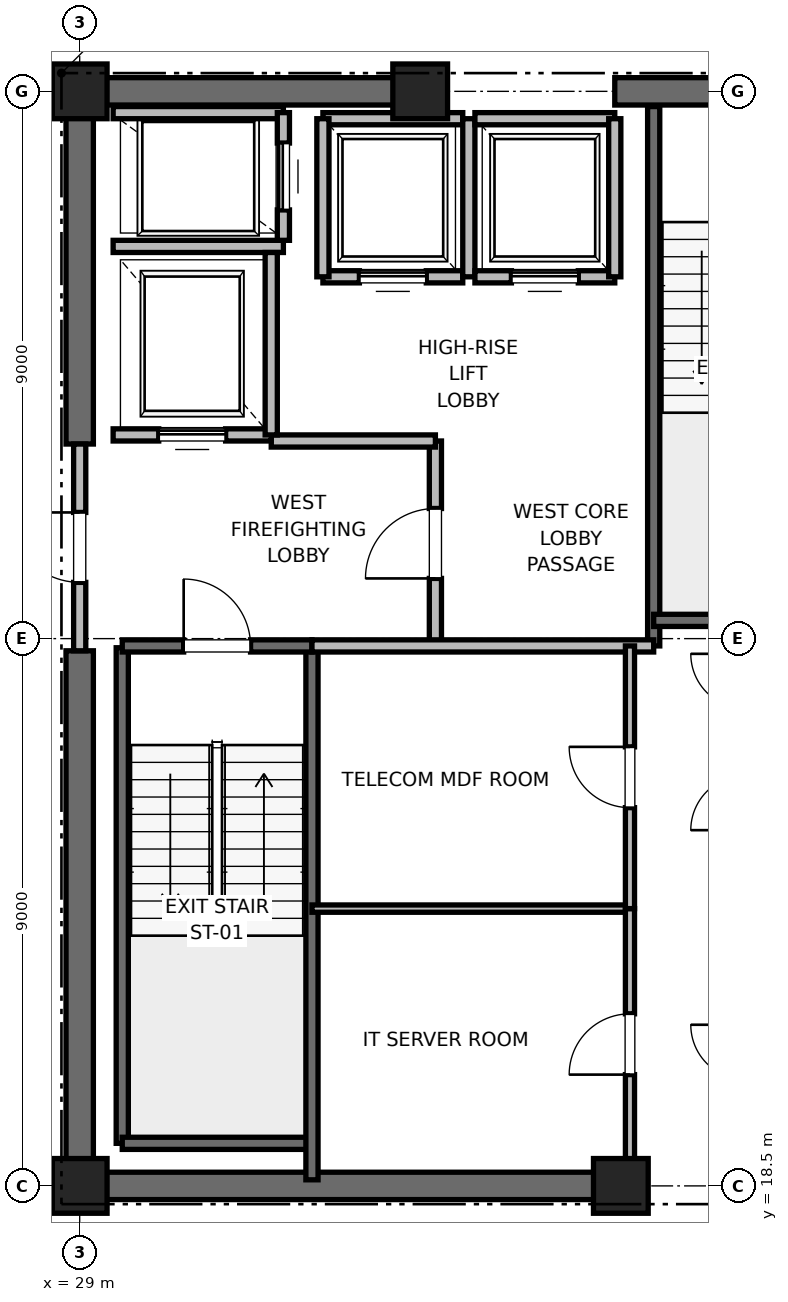
"""IFC4 building model, lengths in metres.
Left out: names, types, materials, properties, quantities, classifications, styles, units other than length and angle.
Written with IfcOpenShell. Run it as: python <this file> out.ifc"""

import sys

from ifc_helpers import new_model, si_unit, direction, frame, frame_2d, origin, origin_2d, place, context, subcontext, project, spatial, rectangle, extrude, element, fill, save


model = new_model("IFC4")
c1 = context("Model", 3, precision=1e-05, world=origin(), true_north=direction((0.0, 1.0)))
c2 = subcontext(c1, "Body", "Model", "MODEL_VIEW")
j1 = project(units=[si_unit("LENGTHUNIT", "METRE"), si_unit("PLANEANGLEUNIT", "RADIAN")], contexts=[c1])
p1 = place(None, origin())
s1 = spatial("IfcSite", under=j1, at=p1, CompositionType="ELEMENT")
p2 = place(p1, origin())
s2 = spatial("IfcBuilding", under=s1, at=p2, CompositionType="ELEMENT")
p3 = place(p2, frame((0.0, 0.0, 291.2)))
s3 = spatial("IfcBuildingStorey", under=s2, at=p3, CompositionType="ELEMENT", Elevation=291.2)
for number, where, z_axis, x_axis in (
    (1, (29.0, 18.5, 0.0), (0.0, 0.0, 1.0), (1.0, 0.0, 0.0)),
    (2, (29.0, 36.5, 0.0), (0.0, 0.0, 1.0), (1.0, 0.0, 0.0)),
    (3, (37.9, 18.5, 0.0), (0.0, 0.0, 1.0), (1.0, 0.0, 0.0)),
    (4, (34.6, 36.5, 0.0), (0.0, 0.0, 1.0), (1.0, 0.0, 0.0)),
):
    element("IfcColumn", number, at=place(p3, frame(where, z_axis=z_axis, x_axis=x_axis)), inside=s3, PredefinedType="PILASTER", context=c2, shape_type="SweptSolid", body=[
        extrude(rectangle(XDim=0.9, YDim=0.9, at=origin_2d()), origin(), (0.0, 0.0, 1.0), 4.0),
    ])
p4 = place(p3, frame((29.0, 18.5, 0.0), z_axis=(0.0, 0.0, 1.0), x_axis=(1.0, 0.0, 0.0)))
e5 = element("IfcWall", 5, at=p4, inside=s3, PredefinedType="SHEAR", context=c2, shape_type="SweptSolid", body=[
    extrude(rectangle(XDim=9.2, YDim=0.45, at=frame_2d((4.6, 0.0))), origin(), (0.0, 0.0, 1.0), 3.7),
])
p5 = place(p3, frame((29.0, 36.5, 0.0), z_axis=(0.0, 0.0, 1.0), x_axis=(1.0, 0.0, 0.0)))
e6 = element("IfcWall", 6, at=p5, inside=s3, PredefinedType="SHEAR", context=c2, shape_type="SweptSolid", body=[
    extrude(rectangle(XDim=5.8, YDim=0.45, at=frame_2d((2.9, 0.0))), origin(), (0.0, 0.0, 1.0), 3.7),
])
p6 = place(p3, frame((37.8, 36.5, 0.0), z_axis=(0.0, 0.0, 1.0), x_axis=(1.0, 0.0, 0.0)))
e7 = element("IfcWall", 7, at=p6, inside=s3, PredefinedType="SHEAR", context=c2, shape_type="SweptSolid", body=[
    extrude(rectangle(XDim=4.4, YDim=0.45, at=frame_2d((2.2, 0.0))), origin(), (0.0, 0.0, 1.0), 3.7),
])
p7 = place(p6, frame((1.65, 0.0, 0.0)))
e8 = element("IfcOpeningElement", 8, at=p7, cuts=e7, PredefinedType="OPENING", context=c2, shape_type="SweptSolid", body=[
    extrude(rectangle(XDim=1.1, YDim=2.15, at=frame_2d((0.55, 1.075))), frame((0.0, 0.225, 0.0), z_axis=(0.0, -1.0, 0.0), x_axis=(1.0, 0.0, 0.0)), (0.0, 0.0, 1.0), 0.45),
])
p8 = place(p3, frame((29.0, 18.5, 0.0), z_axis=(0.0, 0.0, 1.0), x_axis=(0.0, 1.0, 0.0)))
e9 = element("IfcWall", 9, at=p8, inside=s3, PredefinedType="SHEAR", context=c2, shape_type="SweptSolid", body=[
    extrude(rectangle(XDim=8.8, YDim=0.45, at=frame_2d((4.4, 0.0))), origin(), (0.0, 0.0, 1.0), 3.7),
])
p9 = place(p3, frame((29.0, 30.7, 0.0), z_axis=(0.0, 0.0, 1.0), x_axis=(0.0, 1.0, 0.0)))
e10 = element("IfcWall", 10, at=p9, inside=s3, PredefinedType="SHEAR", context=c2, shape_type="SweptSolid", body=[
    extrude(rectangle(XDim=5.8, YDim=0.45, at=frame_2d((2.9, 0.0))), origin(), (0.0, 0.0, 1.0), 3.7),
])
p10 = place(p3, frame((29.7, 19.2, 0.0), z_axis=(0.0, 0.0, 1.0), x_axis=(0.0, 1.0, 0.0)))
e11 = element("IfcWall", 11, at=p10, inside=s3, PredefinedType="SOLIDWALL", context=c2, shape_type="SweptSolid", body=[
    extrude(rectangle(XDim=8.15, YDim=0.2, at=frame_2d((4.075, 0.0))), origin(), (0.0, 0.0, 1.0), 3.7),
])
p11 = place(p3, frame((29.7, 19.2, 0.0), z_axis=(0.0, 0.0, 1.0), x_axis=(1.0, 0.0, 0.0)))
e12 = element("IfcWall", 12, at=p11, inside=s3, PredefinedType="SOLIDWALL", context=c2, shape_type="SweptSolid", body=[
    extrude(rectangle(XDim=3.12, YDim=0.2, at=frame_2d((1.56, 0.0))), origin(), (0.0, 0.0, 1.0), 3.7),
])
p12 = place(p3, frame((32.82, 18.6, 0.0), z_axis=(0.0, 0.0, 1.0), x_axis=(0.0, 1.0, 0.0)))
e13 = element("IfcWall", 13, at=p12, inside=s3, PredefinedType="SOLIDWALL", context=c2, shape_type="SweptSolid", body=[
    extrude(rectangle(XDim=8.78, YDim=0.2, at=frame_2d((4.39, 0.0))), origin(), (0.0, 0.0, 1.0), 3.7),
])
p13 = place(p3, frame((29.7, 27.38, 0.0), z_axis=(0.0, 0.0, 1.0), x_axis=(1.0, 0.0, 0.0)))
e14 = element("IfcWall", 14, at=p13, inside=s3, PredefinedType="SOLIDWALL", context=c2, shape_type="SweptSolid", body=[
    extrude(rectangle(XDim=3.12, YDim=0.2, at=frame_2d((1.56, 0.0))), origin(), (0.0, 0.0, 1.0), 3.7),
])
p14 = place(p13, frame((1.01, 0.0, 0.0)))
e15 = element("IfcOpeningElement", 15, at=p14, cuts=e14, PredefinedType="OPENING", context=c2, shape_type="SweptSolid", body=[
    extrude(rectangle(XDim=1.1, YDim=2.15, at=frame_2d((0.55, 1.075))), frame((0.0, 0.1, 0.0), z_axis=(0.0, -1.0, 0.0), x_axis=(1.0, 0.0, 0.0)), (0.0, 0.0, 1.0), 0.2),
])
p15 = place(p3, frame((38.44, 27.38, 0.0), z_axis=(0.0, 0.0, 1.0), x_axis=(0.0, 1.0, 0.0)))
e16 = element("IfcWall", 16, at=p15, inside=s3, PredefinedType="SOLIDWALL", context=c2, shape_type="SweptSolid", body=[
    extrude(rectangle(XDim=8.87, YDim=0.2, at=frame_2d((4.435, 0.0))), origin(), (0.0, 0.0, 1.0), 3.7),
])
p16 = place(p3, frame((38.44, 27.8, 0.0), z_axis=(0.0, 0.0, 1.0), x_axis=(1.0, 0.0, 0.0)))
e17 = element("IfcWall", 17, at=p16, inside=s3, PredefinedType="SOLIDWALL", context=c2, shape_type="SweptSolid", body=[
    extrude(rectangle(XDim=3.32, YDim=0.2, at=frame_2d((1.66, 0.0))), origin(), (0.0, 0.0, 1.0), 3.7),
])
p17 = place(p3, frame((34.85, 27.38, 0.0), z_axis=(0.0, 0.0, 1.0), x_axis=(0.0, 1.0, 0.0)))
e18 = element("IfcWall", 18, at=p17, inside=s3, PredefinedType="PARTITIONING", context=c2, shape_type="SweptSolid", body=[
    extrude(rectangle(XDim=3.37, YDim=0.2, at=frame_2d((1.685, 0.0))), origin(), (0.0, 0.0, 1.0), 3.7),
])
p18 = place(p17, frame((1.11, 0.0, 0.0)))
e19 = element("IfcOpeningElement", 19, at=p18, cuts=e18, PredefinedType="OPENING", context=c2, shape_type="SweptSolid", body=[
    extrude(rectangle(XDim=1.15, YDim=2.2, at=frame_2d((0.575, 1.1))), frame((0.0, 0.1, 0.0), z_axis=(0.0, -1.0, 0.0), x_axis=(1.0, 0.0, 0.0)), (0.0, 0.0, 1.0), 0.2),
])
p19 = place(p3, frame((29.0, 27.3, 0.0), z_axis=(0.0, 0.0, 1.0), x_axis=(0.0, 1.0, 0.0)))
e20 = element("IfcWall", 20, at=p19, inside=s3, PredefinedType="PARTITIONING", context=c2, shape_type="SweptSolid", body=[
    extrude(rectangle(XDim=3.4, YDim=0.2, at=frame_2d((1.7, 0.0))), origin(), (0.0, 0.0, 1.0), 2.78),
])
p20 = place(p19, frame((1.125, 0.0, 0.0)))
e21 = element("IfcOpeningElement", 21, at=p20, cuts=e20, PredefinedType="OPENING", context=c2, shape_type="SweptSolid", body=[
    extrude(rectangle(XDim=1.15, YDim=2.2, at=frame_2d((0.575, 1.1))), frame((0.0, 0.1, 0.0), z_axis=(0.0, -1.0, 0.0), x_axis=(1.0, 0.0, 0.0)), (0.0, 0.0, 1.0), 0.2),
])
p21 = place(p3, frame((32.82, 27.38, 0.0), z_axis=(0.0, 0.0, 1.0), x_axis=(1.0, 0.0, 0.0)))
e22 = element("IfcWall", 22, at=p21, inside=s3, PredefinedType="PARTITIONING", context=c2, shape_type="SweptSolid", body=[
    extrude(rectangle(XDim=5.62, YDim=0.2, at=frame_2d((2.81, 0.0))), origin(), (0.0, 0.0, 1.0), 3.7),
])
p22 = place(p3, frame((32.15, 30.75, 0.0), z_axis=(0.0, 0.0, 1.0), x_axis=(1.0, 0.0, 0.0)))
e23 = element("IfcWall", 23, at=p22, inside=s3, PredefinedType="PARTITIONING", context=c2, shape_type="SweptSolid", body=[
    extrude(rectangle(XDim=2.7, YDim=0.2, at=frame_2d((1.35, 0.0))), origin(), (0.0, 0.0, 1.0), 3.7),
])
p23 = place(p3, frame((29.55, 30.85, 0.0), z_axis=(0.0, 0.0, 1.0), x_axis=(1.0, 0.0, 0.0)))
e24 = element("IfcWall", 24, at=p23, inside=s3, PredefinedType="SOLIDWALL", context=c2, shape_type="SweptSolid", body=[
    extrude(rectangle(XDim=2.6, YDim=0.2, at=frame_2d((1.3, 0.0))), origin(), (0.0, 0.0, 1.0), 2.78),
])
p24 = place(p23, frame((0.75, 0.0, 0.0)))
e25 = element("IfcOpeningElement", 25, at=p24, cuts=e24, PredefinedType="OPENING", context=c2, shape_type="SweptSolid", body=[
    extrude(rectangle(XDim=1.1, YDim=2.2, at=frame_2d((0.55, 1.1))), frame((0.0, 0.1, 0.0), z_axis=(0.0, -1.0, 0.0), x_axis=(1.0, 0.0, 0.0)), (0.0, 0.0, 1.0), 0.2),
])
p25 = place(p3, frame((29.55, 33.95, 0.0), z_axis=(0.0, 0.0, 1.0), x_axis=(1.0, 0.0, 0.0)))
e26 = element("IfcWall", 26, at=p25, inside=s3, PredefinedType="SOLIDWALL", context=c2, shape_type="SweptSolid", body=[
    extrude(rectangle(XDim=2.8, YDim=0.2, at=frame_2d((1.4, 0.0))), origin(), (0.0, 0.0, 1.0), 3.7),
])
p26 = place(p3, frame((32.15, 30.85, 0.0), z_axis=(0.0, 0.0, 1.0), x_axis=(0.0, 1.0, 0.0)))
e27 = element("IfcWall", 27, at=p26, inside=s3, PredefinedType="SOLIDWALL", context=c2, shape_type="SweptSolid", body=[
    extrude(rectangle(XDim=3.0, YDim=0.2, at=frame_2d((1.5, 0.0))), origin(), (0.0, 0.0, 1.0), 3.7),
])
p27 = place(p3, frame((32.35, 36.15, 0.0), z_axis=(0.0, 0.0, 1.0), x_axis=(-1.0, 0.0, 0.0)))
e28 = element("IfcWall", 28, at=p27, inside=s3, PredefinedType="SOLIDWALL", context=c2, shape_type="SweptSolid", body=[
    extrude(rectangle(XDim=2.8, YDim=0.2, at=frame_2d((1.4, 0.0))), origin(), (0.0, 0.0, 1.0), 2.753),
])
p28 = place(p3, frame((32.35, 34.05, 0.0), z_axis=(0.0, 0.0, 1.0), x_axis=(0.0, 1.0, 0.0)))
e29 = element("IfcWall", 29, at=p28, inside=s3, PredefinedType="SOLIDWALL", context=c2, shape_type="SweptSolid", body=[
    extrude(rectangle(XDim=2.1, YDim=0.2, at=frame_2d((1.05, 0.0))), origin(), (0.0, 0.0, 1.0), 3.7),
])
p29 = place(p28, frame((0.5, 0.0, 0.0)))
e30 = element("IfcOpeningElement", 30, at=p29, cuts=e29, PredefinedType="OPENING", context=c2, shape_type="SweptSolid", body=[
    extrude(rectangle(XDim=1.1, YDim=2.2, at=frame_2d((0.55, 1.1))), frame((0.0, 0.1, 0.0), z_axis=(0.0, -1.0, 0.0), x_axis=(1.0, 0.0, 0.0)), (0.0, 0.0, 1.0), 0.2),
])
p30 = place(p3, frame((33.0, 33.45, 0.0), z_axis=(0.0, 0.0, 1.0), x_axis=(1.0, 0.0, 0.0)))
e31 = element("IfcWall", 31, at=p30, inside=s3, PredefinedType="SOLIDWALL", context=c2, shape_type="SweptSolid", body=[
    extrude(rectangle(XDim=2.3, YDim=0.2, at=frame_2d((1.15, 0.0))), origin(), (0.0, 0.0, 1.0), 3.7),
])
p31 = place(p30, frame((0.6, 0.0, 0.0)))
e32 = element("IfcOpeningElement", 32, at=p31, cuts=e31, PredefinedType="OPENING", context=c2, shape_type="SweptSolid", body=[
    extrude(rectangle(XDim=1.1, YDim=2.2, at=frame_2d((0.55, 1.1))), frame((0.0, 0.1, 0.0), z_axis=(0.0, -1.0, 0.0), x_axis=(1.0, 0.0, 0.0)), (0.0, 0.0, 1.0), 0.2),
])
p32 = place(p3, frame((35.3, 36.05, 0.0), z_axis=(0.0, 0.0, 1.0), x_axis=(-1.0, 0.0, 0.0)))
e33 = element("IfcWall", 33, at=p32, inside=s3, PredefinedType="SOLIDWALL", context=c2, shape_type="SweptSolid", body=[
    extrude(rectangle(XDim=2.3, YDim=0.2, at=frame_2d((1.15, 0.0))), origin(), (0.0, 0.0, 1.0), 2.78),
])
p33 = place(p3, frame((33.0, 36.05, 0.0), z_axis=(0.0, 0.0, 1.0), x_axis=(0.0, -1.0, 0.0)))
e34 = element("IfcWall", 34, at=p33, inside=s3, PredefinedType="SOLIDWALL", context=c2, shape_type="SweptSolid", body=[
    extrude(rectangle(XDim=2.6, YDim=0.2, at=frame_2d((1.3, 0.0))), origin(), (0.0, 0.0, 1.0), 3.7),
])
p34 = place(p3, frame((35.4, 33.45, 0.0), z_axis=(0.0, 0.0, 1.0), x_axis=(0.0, 1.0, 0.0)))
e35 = element("IfcWall", 35, at=p34, inside=s3, PredefinedType="SOLIDWALL", context=c2, shape_type="SweptSolid", body=[
    extrude(rectangle(XDim=2.6, YDim=0.2, at=frame_2d((1.3, 0.0))), origin(), (0.0, 0.0, 1.0), 2.78),
])
p35 = place(p3, frame((35.5, 33.45, 0.0), z_axis=(0.0, 0.0, 1.0), x_axis=(1.0, 0.0, 0.0)))
e36 = element("IfcWall", 36, at=p35, inside=s3, PredefinedType="SOLIDWALL", context=c2, shape_type="SweptSolid", body=[
    extrude(rectangle(XDim=2.3, YDim=0.2, at=frame_2d((1.15, 0.0))), origin(), (0.0, 0.0, 1.0), 3.7),
])
p36 = place(p35, frame((0.6, 0.0, 0.0)))
e37 = element("IfcOpeningElement", 37, at=p36, cuts=e36, PredefinedType="OPENING", context=c2, shape_type="SweptSolid", body=[
    extrude(rectangle(XDim=1.1, YDim=2.2, at=frame_2d((0.55, 1.1))), frame((0.0, 0.1, 0.0), z_axis=(0.0, -1.0, 0.0), x_axis=(1.0, 0.0, 0.0)), (0.0, 0.0, 1.0), 0.2),
])
p37 = place(p3, frame((37.8, 36.05, 0.0), z_axis=(0.0, 0.0, 1.0), x_axis=(-1.0, 0.0, 0.0)))
e38 = element("IfcWall", 38, at=p37, inside=s3, PredefinedType="SOLIDWALL", context=c2, shape_type="SweptSolid", body=[
    extrude(rectangle(XDim=2.3, YDim=0.2, at=frame_2d((1.15, 0.0))), origin(), (0.0, 0.0, 1.0), 2.78),
])
p38 = place(p3, frame((37.8, 33.45, 0.0), z_axis=(0.0, 0.0, 1.0), x_axis=(0.0, 1.0, 0.0)))
e39 = element("IfcWall", 39, at=p38, inside=s3, PredefinedType="SOLIDWALL", context=c2, shape_type="SweptSolid", body=[
    extrude(rectangle(XDim=2.6, YDim=0.2, at=frame_2d((1.3, 0.0))), origin(), (0.0, 0.0, 1.0), 2.78),
])
p39 = place(p3, frame((32.82, 23.06, 0.0), z_axis=(0.0, 0.0, 1.0), x_axis=(1.0, 0.0, 0.0)))
e40 = element("IfcWall", 40, at=p39, inside=s3, PredefinedType="PARTITIONING", context=c2, shape_type="SweptSolid", body=[
    extrude(rectangle(XDim=5.23, YDim=0.12, at=frame_2d((2.615, 0.0))), origin(), (0.0, 0.0, 1.0), 2.85),
])
p40 = place(p3, frame((38.05, 18.6, 0.0), z_axis=(0.0, 0.0, 1.0), x_axis=(0.0, 1.0, 0.0)))
e41 = element("IfcWall", 41, at=p40, inside=s3, PredefinedType="PARTITIONING", context=c2, shape_type="SweptSolid", body=[
    extrude(rectangle(XDim=4.46, YDim=0.15, at=frame_2d((2.23, 0.0))), origin(), (0.0, 0.0, 1.0), 2.78),
])
p41 = place(p40, frame((1.73, 0.0, 0.0)))
e42 = element("IfcOpeningElement", 42, at=p41, cuts=e41, PredefinedType="OPENING", context=c2, shape_type="SweptSolid", body=[
    extrude(rectangle(XDim=1.0, YDim=2.15, at=frame_2d((0.5, 1.075))), frame((0.0, 0.075, 0.0), z_axis=(0.0, -1.0, 0.0), x_axis=(1.0, 0.0, 0.0)), (0.0, 0.0, 1.0), 0.15),
])
p42 = place(p3, frame((38.05, 23.06, 0.0), z_axis=(0.0, 0.0, 1.0), x_axis=(0.0, 1.0, 0.0)))
e43 = element("IfcWall", 43, at=p42, inside=s3, PredefinedType="PARTITIONING", context=c2, shape_type="SweptSolid", body=[
    extrude(rectangle(XDim=4.32, YDim=0.15, at=frame_2d((2.16, 0.0))), origin(), (0.0, 0.0, 1.0), 2.85),
])
p43 = place(p42, frame((1.66, 0.0, 0.0)))
e44 = element("IfcOpeningElement", 44, at=p43, cuts=e43, PredefinedType="OPENING", context=c2, shape_type="SweptSolid", body=[
    extrude(rectangle(XDim=1.0, YDim=2.15, at=frame_2d((0.5, 1.075))), frame((0.0, 0.075, 0.0), z_axis=(0.0, -1.0, 0.0), x_axis=(1.0, 0.0, 0.0)), (0.0, 0.0, 1.0), 0.15),
])
p44 = place(p14, origin())
e45 = element("IfcDoor", 45, at=p44, inside=s3, OperationType="SINGLE_SWING_LEFT", PredefinedType="DOOR", context=c2, shape_type="SweptSolid", body=[
    extrude(rectangle(XDim=1.1, YDim=2.15, at=frame_2d((0.55, 1.075))), frame((0.0, 0.025, 0.0), z_axis=(0.0, -1.0, 0.0), x_axis=(1.0, 0.0, 0.0)), (0.0, 0.0, 1.0), 0.05),
])
fill(e15, e45)
p45 = place(p18, origin())
e46 = element("IfcDoor", 46, at=p45, inside=s3, OperationType="SINGLE_SWING_LEFT", PredefinedType="DOOR", context=c2, shape_type="SweptSolid", body=[
    extrude(rectangle(XDim=1.15, YDim=2.2, at=frame_2d((0.575, 1.1))), frame((0.0, 0.025, 0.0), z_axis=(0.0, -1.0, 0.0), x_axis=(1.0, 0.0, 0.0)), (0.0, 0.0, 1.0), 0.05),
])
fill(e19, e46)
p46 = place(p20, origin())
e47 = element("IfcDoor", 47, at=p46, inside=s3, OperationType="SINGLE_SWING_RIGHT", PredefinedType="DOOR", context=c2, shape_type="SweptSolid", body=[
    extrude(rectangle(XDim=1.15, YDim=2.2, at=frame_2d((0.575, 1.1))), frame((0.0, 0.025, 0.0), z_axis=(0.0, -1.0, 0.0), x_axis=(1.0, 0.0, 0.0)), (0.0, 0.0, 1.0), 0.05),
])
fill(e21, e47)
p47 = place(p24, origin())
e48 = element("IfcDoor", 48, at=p47, inside=s3, OperationType="SLIDING_TO_RIGHT", PredefinedType="DOOR", context=c2, shape_type="SweptSolid", body=[
    extrude(rectangle(XDim=1.1, YDim=2.2, at=frame_2d((0.55, 1.1))), frame((0.0, 0.025, 0.0), z_axis=(0.0, -1.0, 0.0), x_axis=(1.0, 0.0, 0.0)), (0.0, 0.0, 1.0), 0.05),
])
fill(e25, e48)
p48 = place(p29, origin())
e49 = element("IfcDoor", 49, at=p48, inside=s3, OperationType="SLIDING_TO_RIGHT", PredefinedType="DOOR", context=c2, shape_type="SweptSolid", body=[
    extrude(rectangle(XDim=1.1, YDim=2.2, at=frame_2d((0.55, 1.1))), frame((0.0, 0.025, 0.0), z_axis=(0.0, -1.0, 0.0), x_axis=(1.0, 0.0, 0.0)), (0.0, 0.0, 1.0), 0.05),
])
fill(e30, e49)
p49 = place(p31, origin())
e50 = element("IfcDoor", 50, at=p49, inside=s3, OperationType="SLIDING_TO_RIGHT", PredefinedType="DOOR", context=c2, shape_type="SweptSolid", body=[
    extrude(rectangle(XDim=1.1, YDim=2.2, at=frame_2d((0.55, 1.1))), frame((0.0, 0.025, 0.0), z_axis=(0.0, -1.0, 0.0), x_axis=(1.0, 0.0, 0.0)), (0.0, 0.0, 1.0), 0.05),
])
fill(e32, e50)
p50 = place(p36, origin())
e51 = element("IfcDoor", 51, at=p50, inside=s3, OperationType="SLIDING_TO_RIGHT", PredefinedType="DOOR", context=c2, shape_type="SweptSolid", body=[
    extrude(rectangle(XDim=1.1, YDim=2.2, at=frame_2d((0.55, 1.1))), frame((0.0, 0.025, 0.0), z_axis=(0.0, -1.0, 0.0), x_axis=(1.0, 0.0, 0.0)), (0.0, 0.0, 1.0), 0.05),
])
fill(e37, e51)
p51 = place(p41, origin())
e52 = element("IfcDoor", 52, at=p51, inside=s3, OperationType="SINGLE_SWING_LEFT", PredefinedType="DOOR", context=c2, shape_type="SweptSolid", body=[
    extrude(rectangle(XDim=1.0, YDim=2.15, at=frame_2d((0.5, 1.075))), frame((0.0, 0.025, 0.0), z_axis=(0.0, -1.0, 0.0), x_axis=(1.0, 0.0, 0.0)), (0.0, 0.0, 1.0), 0.05),
])
fill(e42, e52)
p52 = place(p43, origin())
e53 = element("IfcDoor", 53, at=p52, inside=s3, OperationType="SINGLE_SWING_RIGHT", PredefinedType="DOOR", context=c2, shape_type="SweptSolid", body=[
    extrude(rectangle(XDim=1.0, YDim=2.15, at=frame_2d((0.5, 1.075))), frame((0.0, 0.025, 0.0), z_axis=(0.0, -1.0, 0.0), x_axis=(1.0, 0.0, 0.0)), (0.0, 0.0, 1.0), 0.05),
])
fill(e44, e53)
save(model, sys.argv[1])
